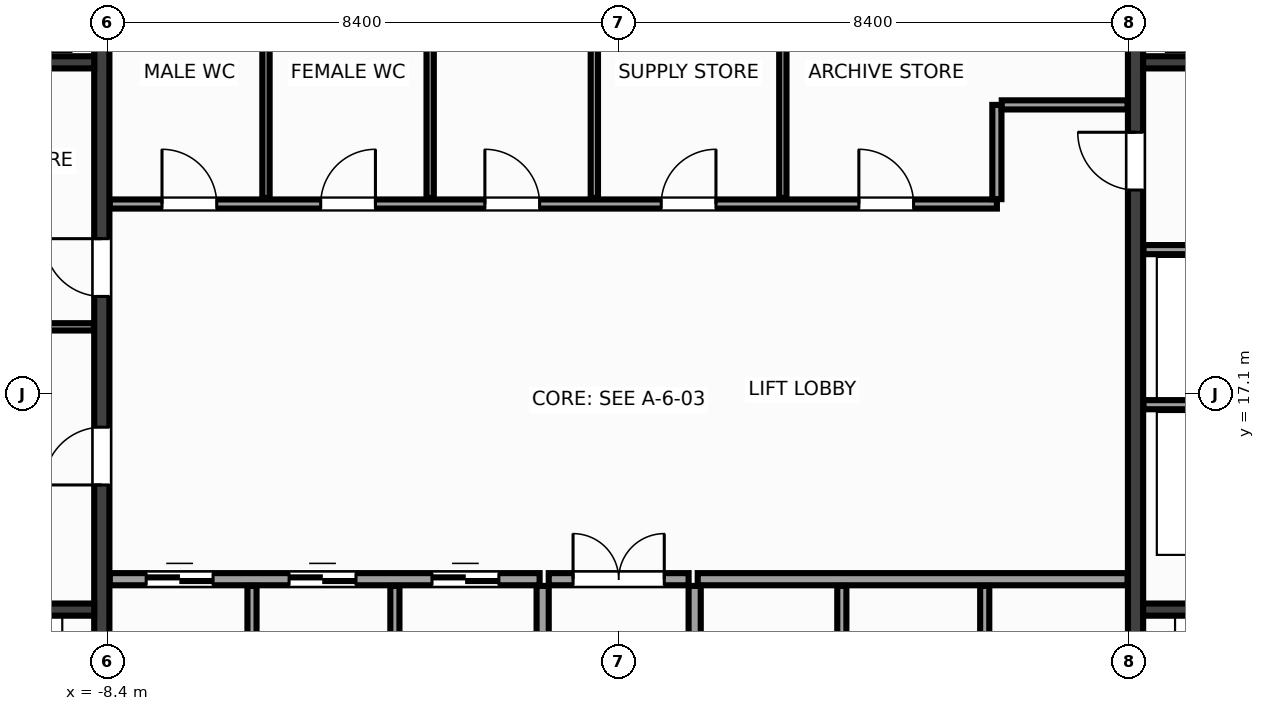
"""IFC4 building model, lengths in metres.
Left out: names, types, materials, properties, quantities, classifications, styles, units other than length and angle.
Written with IfcOpenShell. Run it as: python <this file> out.ifc"""

import sys

from ifc_helpers import new_model, si_unit, direction, frame, frame_2d, origin, place, context, subcontext, project, spatial, rectangle, extrude, source, transform, mapped, element, fill, save


model = new_model("IFC4")
c1 = context("Model", 3, precision=1e-05, world=origin(), true_north=direction((0.0, 1.0)))
c2 = subcontext(c1, "Body", "Model", "MODEL_VIEW")
j1 = project(units=[si_unit("LENGTHUNIT", "METRE"), si_unit("PLANEANGLEUNIT", "RADIAN")], contexts=[c1])
p1 = place(None, origin())
s1 = spatial("IfcSite", under=j1, at=p1, CompositionType="ELEMENT")
p2 = place(p1, origin())
s2 = spatial("IfcBuilding", under=s1, at=p2, CompositionType="ELEMENT")
p3 = place(p2, frame((0.0, 0.0, 56.0)))
s3 = spatial("IfcBuildingStorey", under=s2, at=p3, CompositionType="ELEMENT", Elevation=56.0)
m1 = source(origin(), c2, "Body", "SweptSolid", [
    extrude(rectangle(XDim=12.8, YDim=0.25, at=frame_2d((6.4, 0.0))), origin(), (0.0, 0.0, 1.0), 3.6),
])
p4 = place(p3, frame((-8.5, 10.6, 0.0), z_axis=(0.0, 0.0, 1.0), x_axis=(0.0, 1.0, 0.0)))
e1 = element("IfcWall", 1, at=p4, inside=s3, PredefinedType="SHEAR", context=c2, shape_type="MappedRepresentation", body=[
    mapped(m1, transform((0.0, 0.0, 0.0), x_axis=(1.0, 0.0, 0.0), y_axis=(0.0, 1.0, 0.0), z_axis=(0.0, 0.0, 1.0), scale=1.0)),
])
p5 = place(p4, frame((5.0, 0.0, 0.0)))
e2 = element("IfcOpeningElement", 2, at=p5, cuts=e1, PredefinedType="OPENING", context=c2, shape_type="SweptSolid", body=[
    extrude(rectangle(XDim=0.95, YDim=2.15, at=frame_2d((0.475, 1.075))), frame((0.0, 0.137, 0.0), z_axis=(0.0, -1.0, 0.0), x_axis=(1.0, 0.0, 0.0)), (0.0, 0.0, 1.0), 0.274),
])
p6 = place(p4, frame((8.1, 0.0, 0.0)))
e3 = element("IfcOpeningElement", 3, at=p6, cuts=e1, PredefinedType="OPENING", context=c2, shape_type="SweptSolid", body=[
    extrude(rectangle(XDim=0.95, YDim=2.15, at=frame_2d((0.475, 1.075))), frame((0.0, 0.137, 0.0), z_axis=(0.0, -1.0, 0.0), x_axis=(1.0, 0.0, 0.0)), (0.0, 0.0, 1.0), 0.274),
])
p7 = place(p3, frame((8.5, 10.6, 0.0), z_axis=(0.0, 0.0, 1.0), x_axis=(0.0, 1.0, 0.0)))
e4 = element("IfcWall", 4, at=p7, inside=s3, PredefinedType="SHEAR", context=c2, shape_type="MappedRepresentation", body=[
    mapped(m1, transform((0.0, 0.0, 0.0), x_axis=(1.0, 0.0, 0.0), y_axis=(0.0, 1.0, 0.0), z_axis=(0.0, 0.0, 1.0), scale=1.0)),
])
p8 = place(p7, frame((9.85, 0.0, 0.0)))
e5 = element("IfcOpeningElement", 5, at=p8, cuts=e4, PredefinedType="OPENING", context=c2, shape_type="SweptSolid", body=[
    extrude(rectangle(XDim=0.95, YDim=2.15, at=frame_2d((0.475, 1.075))), frame((0.0, 0.137, 0.0), z_axis=(0.0, -1.0, 0.0), x_axis=(1.0, 0.0, 0.0)), (0.0, 0.0, 1.0), 0.274),
])
m2 = source(origin(), c2, "Body", "SweptSolid", [
    extrude(rectangle(XDim=2.825, YDim=0.2, at=frame_2d((1.413, 0.0))), origin(), (0.0, 0.0, 1.0), 3.6),
])
for number, where, z_axis, x_axis in (
    (6, (-11.45, 13.55, 0.0), (0.0, 0.0, 1.0), (1.0, 0.0, 0.0)),
    (7, (8.625, 13.55, 0.0), (0.0, 0.0, 1.0), (1.0, 0.0, 0.0)),
):
    element("IfcWall", number, at=place(p3, frame(where, z_axis=z_axis, x_axis=x_axis)), inside=s3, PredefinedType="SHEAR", context=c2, shape_type="MappedRepresentation", body=[
        mapped(m2, transform((0.0, 0.0, 0.0), x_axis=(1.0, 0.0, 0.0), y_axis=(0.0, 1.0, 0.0), z_axis=(0.0, 0.0, 1.0), scale=1.0)),
    ])
m3 = source(origin(), c2, "Body", "SweptSolid", [
    extrude(rectangle(XDim=3.02, YDim=0.2, at=frame_2d((1.51, 0.0))), origin(), (0.0, 0.0, 1.0), 3.6),
])
for number, where, z_axis, x_axis in (
    (8, (-11.645, 22.55, 0.0), (0.0, 0.0, 1.0), (1.0, 0.0, 0.0)),
    (9, (8.625, 22.55, 0.0), (0.0, 0.0, 1.0), (1.0, 0.0, 0.0)),
):
    element("IfcWall", number, at=place(p3, frame(where, z_axis=z_axis, x_axis=x_axis)), inside=s3, PredefinedType="SHEAR", context=c2, shape_type="MappedRepresentation", body=[
        mapped(m3, transform((0.0, 0.0, 0.0), x_axis=(1.0, 0.0, 0.0), y_axis=(0.0, 1.0, 0.0), z_axis=(0.0, 0.0, 1.0), scale=1.0)),
    ])
m4 = source(origin(), c2, "Body", "SweptSolid", [
    extrude(rectangle(XDim=3.01, YDim=0.12, at=frame_2d((1.505, 0.0))), origin(), (0.0, 0.0, 1.0), 3.36),
])
p9 = place(p3, frame((-11.64, 18.2, 0.0), z_axis=(0.0, 0.0, 1.0), x_axis=(1.0, 0.0, 0.0)))
e10 = element("IfcWall", 10, at=p9, inside=s3, PredefinedType="PARTITIONING", context=c2, shape_type="MappedRepresentation", body=[
    mapped(m4, transform((0.0, 0.0, 0.0), x_axis=(1.0, 0.0, 0.0), y_axis=(0.0, 1.0, 0.0), z_axis=(0.0, 0.0, 1.0), scale=1.0)),
])
m5 = source(origin(), c2, "Body", "SweptSolid", [
    extrude(rectangle(XDim=3.01, YDim=0.15, at=frame_2d((1.505, 0.0))), origin(), (0.0, 0.0, 1.0), 3.36),
])
for number, where, z_axis, x_axis in (
    (11, (8.63, 16.92, 0.0), (0.0, 0.0, 1.0), (1.0, 0.0, 0.0)),
    (12, (8.63, 19.47, 0.0), (0.0, 0.0, 1.0), (1.0, 0.0, 0.0)),
):
    element("IfcWall", number, at=place(p3, frame(where, z_axis=z_axis, x_axis=x_axis)), inside=s3, PredefinedType="PARTITIONING", context=c2, shape_type="MappedRepresentation", body=[
        mapped(m5, transform((0.0, 0.0, 0.0), x_axis=(1.0, 0.0, 0.0), y_axis=(0.0, 1.0, 0.0), z_axis=(0.0, 0.0, 1.0), scale=1.0)),
    ])
m6 = source(origin(), c2, "Body", "SweptSolid", [
    extrude(rectangle(XDim=7.07, YDim=0.2, at=frame_2d((3.535, 0.0))), origin(), (0.0, 0.0, 1.0), 3.36),
])
p10 = place(p3, frame((-8.37, 14.05, 0.0), z_axis=(0.0, 0.0, 1.0), x_axis=(1.0, 0.0, 0.0)))
e13 = element("IfcWall", 13, at=p10, inside=s3, PredefinedType="PARTITIONING", context=c2, shape_type="MappedRepresentation", body=[
    mapped(m6, transform((0.0, 0.0, 0.0), x_axis=(1.0, 0.0, 0.0), y_axis=(0.0, 1.0, 0.0), z_axis=(0.0, 0.0, 1.0), scale=1.0)),
])
p11 = place(p10, frame((0.6, 0.0, 0.0)))
e14 = element("IfcOpeningElement", 14, at=p11, cuts=e13, PredefinedType="OPENING", context=c2, shape_type="SweptSolid", body=[
    extrude(rectangle(XDim=1.1, YDim=2.15, at=frame_2d((0.55, 1.075))), frame((0.0, 0.112, 0.0), z_axis=(0.0, -1.0, 0.0), x_axis=(1.0, 0.0, 0.0)), (0.0, 0.0, 1.0), 0.224),
])
p12 = place(p10, frame((2.95, 0.0, 0.0)))
e15 = element("IfcOpeningElement", 15, at=p12, cuts=e13, PredefinedType="OPENING", context=c2, shape_type="SweptSolid", body=[
    extrude(rectangle(XDim=1.1, YDim=2.15, at=frame_2d((0.55, 1.075))), frame((0.0, 0.112, 0.0), z_axis=(0.0, -1.0, 0.0), x_axis=(1.0, 0.0, 0.0)), (0.0, 0.0, 1.0), 0.224),
])
p13 = place(p10, frame((5.3, 0.0, 0.0)))
e16 = element("IfcOpeningElement", 16, at=p13, cuts=e13, PredefinedType="OPENING", context=c2, shape_type="SweptSolid", body=[
    extrude(rectangle(XDim=1.1, YDim=2.15, at=frame_2d((0.55, 1.075))), frame((0.0, 0.112, 0.0), z_axis=(0.0, -1.0, 0.0), x_axis=(1.0, 0.0, 0.0)), (0.0, 0.0, 1.0), 0.224),
])
p14 = place(p3, frame((1.3, 14.05, 0.0), z_axis=(0.0, 0.0, 1.0), x_axis=(1.0, 0.0, 0.0)))
e17 = element("IfcWall", 17, at=p14, inside=s3, PredefinedType="PARTITIONING", context=c2, shape_type="MappedRepresentation", body=[
    mapped(m6, transform((0.0, 0.0, 0.0), x_axis=(1.0, 0.0, 0.0), y_axis=(0.0, 1.0, 0.0), z_axis=(0.0, 0.0, 1.0), scale=1.0)),
])
m7 = source(origin(), c2, "Body", "SweptSolid", [
    extrude(rectangle(XDim=3.34, YDim=0.2, at=frame_2d((1.67, 0.0))), origin(), (0.0, 0.0, 1.0), 3.36),
])
for number, where, z_axis, x_axis in (
    (18, (-1.25, 10.6, 0.0), (0.0, 0.0, 1.0), (0.0, 1.0, 0.0)),
    (19, (1.25, 10.6, 0.0), (0.0, 0.0, 1.0), (0.0, 1.0, 0.0)),
):
    element("IfcWall", number, at=place(p3, frame(where, z_axis=z_axis, x_axis=x_axis)), inside=s3, PredefinedType="PARTITIONING", context=c2, shape_type="MappedRepresentation", body=[
        mapped(m7, transform((0.0, 0.0, 0.0), x_axis=(1.0, 0.0, 0.0), y_axis=(0.0, 1.0, 0.0), z_axis=(0.0, 0.0, 1.0), scale=1.0)),
    ])
m8 = source(origin(), c2, "Body", "SweptSolid", [
    extrude(rectangle(XDim=2.3, YDim=0.2, at=frame_2d((1.15, 0.0))), origin(), (0.0, 0.0, 1.0), 3.36),
])
p15 = place(p3, frame((-1.15, 14.05, 0.0), z_axis=(0.0, 0.0, 1.0), x_axis=(1.0, 0.0, 0.0)))
e20 = element("IfcWall", 20, at=p15, inside=s3, PredefinedType="PARTITIONING", context=c2, shape_type="MappedRepresentation", body=[
    mapped(m8, transform((0.0, 0.0, 0.0), x_axis=(1.0, 0.0, 0.0), y_axis=(0.0, 1.0, 0.0), z_axis=(0.0, 0.0, 1.0), scale=1.0)),
])
p16 = place(p15, frame((0.4, 0.0, 0.0)))
e21 = element("IfcOpeningElement", 21, at=p16, cuts=e20, PredefinedType="OPENING", context=c2, shape_type="SweptSolid", body=[
    extrude(rectangle(XDim=1.5, YDim=2.2, at=frame_2d((0.75, 1.1))), frame((0.0, 0.112, 0.0), z_axis=(0.0, -1.0, 0.0), x_axis=(1.0, 0.0, 0.0)), (0.0, 0.0, 1.0), 0.224),
])
m9 = source(origin(), c2, "Body", "SweptSolid", [
    extrude(rectangle(XDim=14.59, YDim=0.15, at=frame_2d((7.295, 0.0))), origin(), (0.0, 0.0, 1.0), 3.36),
])
p17 = place(p3, frame((-8.37, 20.22, 0.0), z_axis=(0.0, 0.0, 1.0), x_axis=(1.0, 0.0, 0.0)))
e22 = element("IfcWall", 22, at=p17, inside=s3, PredefinedType="PARTITIONING", context=c2, shape_type="MappedRepresentation", body=[
    mapped(m9, transform((0.0, 0.0, 0.0), x_axis=(1.0, 0.0, 0.0), y_axis=(0.0, 1.0, 0.0), z_axis=(0.0, 0.0, 1.0), scale=1.0)),
])
p18 = place(p17, frame((0.86, 0.0, 0.0)))
e23 = element("IfcOpeningElement", 23, at=p18, cuts=e22, PredefinedType="OPENING", context=c2, shape_type="SweptSolid", body=[
    extrude(rectangle(XDim=0.9, YDim=2.15, at=frame_2d((0.45, 1.075))), frame((0.0, 0.087, 0.0), z_axis=(0.0, -1.0, 0.0), x_axis=(1.0, 0.0, 0.0)), (0.0, 0.0, 1.0), 0.174),
])
p19 = place(p17, frame((3.47, 0.0, 0.0)))
e24 = element("IfcOpeningElement", 24, at=p19, cuts=e22, PredefinedType="OPENING", context=c2, shape_type="SweptSolid", body=[
    extrude(rectangle(XDim=0.9, YDim=2.15, at=frame_2d((0.45, 1.075))), frame((0.0, 0.087, 0.0), z_axis=(0.0, -1.0, 0.0), x_axis=(1.0, 0.0, 0.0)), (0.0, 0.0, 1.0), 0.174),
])
p20 = place(p17, frame((6.17, 0.0, 0.0)))
e25 = element("IfcOpeningElement", 25, at=p20, cuts=e22, PredefinedType="OPENING", context=c2, shape_type="SweptSolid", body=[
    extrude(rectangle(XDim=0.9, YDim=2.15, at=frame_2d((0.45, 1.075))), frame((0.0, 0.087, 0.0), z_axis=(0.0, -1.0, 0.0), x_axis=(1.0, 0.0, 0.0)), (0.0, 0.0, 1.0), 0.174),
])
p21 = place(p17, frame((9.07, 0.0, 0.0)))
e26 = element("IfcOpeningElement", 26, at=p21, cuts=e22, PredefinedType="OPENING", context=c2, shape_type="SweptSolid", body=[
    extrude(rectangle(XDim=0.9, YDim=2.15, at=frame_2d((0.45, 1.075))), frame((0.0, 0.087, 0.0), z_axis=(0.0, -1.0, 0.0), x_axis=(1.0, 0.0, 0.0)), (0.0, 0.0, 1.0), 0.174),
])
p22 = place(p17, frame((12.32, 0.0, 0.0)))
e27 = element("IfcOpeningElement", 27, at=p22, cuts=e22, PredefinedType="OPENING", context=c2, shape_type="SweptSolid", body=[
    extrude(rectangle(XDim=0.9, YDim=2.15, at=frame_2d((0.45, 1.075))), frame((0.0, 0.087, 0.0), z_axis=(0.0, -1.0, 0.0), x_axis=(1.0, 0.0, 0.0)), (0.0, 0.0, 1.0), 0.174),
])
m10 = source(origin(), c2, "Body", "SweptSolid", [
    extrude(rectangle(XDim=1.55, YDim=0.15, at=frame_2d((0.775, 0.0))), origin(), (0.0, 0.0, 1.0), 3.36),
])
p23 = place(p3, frame((6.22, 20.3, 0.0), z_axis=(0.0, 0.0, 1.0), x_axis=(0.0, 1.0, 0.0)))
e28 = element("IfcWall", 28, at=p23, inside=s3, PredefinedType="PARTITIONING", context=c2, shape_type="MappedRepresentation", body=[
    mapped(m10, transform((0.0, 0.0, 0.0), x_axis=(1.0, 0.0, 0.0), y_axis=(0.0, 1.0, 0.0), z_axis=(0.0, 0.0, 1.0), scale=1.0)),
])
m11 = source(origin(), c2, "Body", "SweptSolid", [
    extrude(rectangle(XDim=2.07, YDim=0.15, at=frame_2d((1.035, 0.0))), origin(), (0.0, 0.0, 1.0), 3.36),
])
p24 = place(p3, frame((6.3, 21.85, 0.0), z_axis=(0.0, 0.0, 1.0), x_axis=(1.0, 0.0, 0.0)))
e29 = element("IfcWall", 29, at=p24, inside=s3, PredefinedType="PARTITIONING", context=c2, shape_type="MappedRepresentation", body=[
    mapped(m11, transform((0.0, 0.0, 0.0), x_axis=(1.0, 0.0, 0.0), y_axis=(0.0, 1.0, 0.0), z_axis=(0.0, 0.0, 1.0), scale=1.0)),
])
m12 = source(origin(), c2, "Body", "SweptSolid", [
    extrude(rectangle(XDim=3.34, YDim=0.15, at=frame_2d((1.67, 0.0))), origin(), (0.0, 0.0, 1.0), 3.36),
])
for number, where, z_axis, x_axis in (
    (30, (-6.03, 10.6, 0.0), (0.0, 0.0, 1.0), (0.0, 1.0, 0.0)),
    (31, (-3.68, 10.6, 0.0), (0.0, 0.0, 1.0), (0.0, 1.0, 0.0)),
    (32, (3.67, 10.6, 0.0), (0.0, 0.0, 1.0), (0.0, 1.0, 0.0)),
    (33, (6.02, 10.6, 0.0), (0.0, 0.0, 1.0), (0.0, 1.0, 0.0)),
):
    element("IfcWall", number, at=place(p3, frame(where, z_axis=z_axis, x_axis=x_axis)), inside=s3, PredefinedType="PARTITIONING", context=c2, shape_type="MappedRepresentation", body=[
        mapped(m12, transform((0.0, 0.0, 0.0), x_axis=(1.0, 0.0, 0.0), y_axis=(0.0, 1.0, 0.0), z_axis=(0.0, 0.0, 1.0), scale=1.0)),
    ])
m13 = source(origin(), c2, "Body", "SweptSolid", [
    extrude(rectangle(XDim=3.04, YDim=0.12, at=frame_2d((1.52, 0.0))), origin(), (0.0, 0.0, 1.0), 3.36),
])
for number, where, z_axis, x_axis in (
    (34, (-5.8, 20.32, 0.0), (0.0, 0.0, 1.0), (0.0, 1.0, 0.0)),
    (35, (-3.1, 20.32, 0.0), (0.0, 0.0, 1.0), (0.0, 1.0, 0.0)),
    (36, (-0.4, 20.32, 0.0), (0.0, 0.0, 1.0), (0.0, 1.0, 0.0)),
    (37, (2.7, 20.32, 0.0), (0.0, 0.0, 1.0), (0.0, 1.0, 0.0)),
):
    element("IfcWall", number, at=place(p3, frame(where, z_axis=z_axis, x_axis=x_axis)), inside=s3, PredefinedType="PARTITIONING", context=c2, shape_type="MappedRepresentation", body=[
        mapped(m13, transform((0.0, 0.0, 0.0), x_axis=(1.0, 0.0, 0.0), y_axis=(0.0, 1.0, 0.0), z_axis=(0.0, 0.0, 1.0), scale=1.0)),
    ])
m14 = source(origin(), c2, "Body", "SweptSolid", [
    extrude(rectangle(XDim=0.95, YDim=2.15, at=frame_2d((0.475, 1.075))), frame((0.0, 0.025, 0.0), z_axis=(0.0, -1.0, 0.0), x_axis=(1.0, 0.0, 0.0)), (0.0, 0.0, 1.0), 0.05),
])
p25 = place(p5, origin())
e38 = element("IfcDoor", 38, at=p25, inside=s3, OperationType="SINGLE_SWING_LEFT", PredefinedType="DOOR", context=c2, shape_type="MappedRepresentation", body=[
    mapped(m14, transform((0.0, 0.0, 0.0), x_axis=(1.0, 0.0, 0.0), y_axis=(0.0, 1.0, 0.0), z_axis=(0.0, 0.0, 1.0), scale=1.0)),
])
fill(e2, e38)
p26 = place(p6, origin())
e39 = element("IfcDoor", 39, at=p26, inside=s3, OperationType="SINGLE_SWING_RIGHT", PredefinedType="DOOR", context=c2, shape_type="MappedRepresentation", body=[
    mapped(m14, transform((0.0, 0.0, 0.0), x_axis=(1.0, 0.0, 0.0), y_axis=(0.0, 1.0, 0.0), z_axis=(0.0, 0.0, 1.0), scale=1.0)),
])
fill(e3, e39)
m15 = source(origin(), c2, "Body", "SweptSolid", [
    extrude(rectangle(XDim=0.95, YDim=2.15, at=frame_2d((0.475, 1.075))), frame((0.0, 0.025, 0.0), z_axis=(0.0, -1.0, 0.0), x_axis=(1.0, 0.0, 0.0)), (0.0, 0.0, 1.0), 0.05),
])
p27 = place(p8, origin())
e40 = element("IfcDoor", 40, at=p27, inside=s3, OperationType="SINGLE_SWING_RIGHT", PredefinedType="DOOR", context=c2, shape_type="MappedRepresentation", body=[
    mapped(m15, transform((0.0, 0.0, 0.0), x_axis=(1.0, 0.0, 0.0), y_axis=(0.0, 1.0, 0.0), z_axis=(0.0, 0.0, 1.0), scale=1.0)),
])
fill(e5, e40)
m16 = source(origin(), c2, "Body", "SweptSolid", [
    extrude(rectangle(XDim=1.1, YDim=2.15, at=frame_2d((0.55, 1.075))), frame((0.0, 0.025, 0.0), z_axis=(0.0, -1.0, 0.0), x_axis=(1.0, 0.0, 0.0)), (0.0, 0.0, 1.0), 0.05),
])
p28 = place(p11, origin())
e41 = element("IfcDoor", 41, at=p28, inside=s3, OperationType="DOUBLE_DOOR_SLIDING", PredefinedType="DOOR", context=c2, shape_type="MappedRepresentation", body=[
    mapped(m16, transform((0.0, 0.0, 0.0), x_axis=(1.0, 0.0, 0.0), y_axis=(0.0, 1.0, 0.0), z_axis=(0.0, 0.0, 1.0), scale=1.0)),
])
fill(e14, e41)
p29 = place(p12, origin())
e42 = element("IfcDoor", 42, at=p29, inside=s3, OperationType="DOUBLE_DOOR_SLIDING", PredefinedType="DOOR", context=c2, shape_type="MappedRepresentation", body=[
    mapped(m16, transform((0.0, 0.0, 0.0), x_axis=(1.0, 0.0, 0.0), y_axis=(0.0, 1.0, 0.0), z_axis=(0.0, 0.0, 1.0), scale=1.0)),
])
fill(e15, e42)
p30 = place(p13, origin())
e43 = element("IfcDoor", 43, at=p30, inside=s3, OperationType="DOUBLE_DOOR_SLIDING", PredefinedType="DOOR", context=c2, shape_type="MappedRepresentation", body=[
    mapped(m16, transform((0.0, 0.0, 0.0), x_axis=(1.0, 0.0, 0.0), y_axis=(0.0, 1.0, 0.0), z_axis=(0.0, 0.0, 1.0), scale=1.0)),
])
fill(e16, e43)
m17 = source(origin(), c2, "Body", "SweptSolid", [
    extrude(rectangle(XDim=1.5, YDim=2.2, at=frame_2d((0.75, 1.1))), frame((0.0, 0.025, 0.0), z_axis=(0.0, -1.0, 0.0), x_axis=(1.0, 0.0, 0.0)), (0.0, 0.0, 1.0), 0.05),
])
p31 = place(p16, origin())
e44 = element("IfcDoor", 44, at=p31, inside=s3, OperationType="DOUBLE_DOOR_SINGLE_SWING", PredefinedType="DOOR", context=c2, shape_type="MappedRepresentation", body=[
    mapped(m17, transform((0.0, 0.0, 0.0), x_axis=(1.0, 0.0, 0.0), y_axis=(0.0, 1.0, 0.0), z_axis=(0.0, 0.0, 1.0), scale=1.0)),
])
fill(e21, e44)
m18 = source(origin(), c2, "Body", "SweptSolid", [
    extrude(rectangle(XDim=0.9, YDim=2.15, at=frame_2d((0.45, 1.075))), frame((0.0, 0.025, 0.0), z_axis=(0.0, -1.0, 0.0), x_axis=(1.0, 0.0, 0.0)), (0.0, 0.0, 1.0), 0.05),
])
p32 = place(p18, origin())
e45 = element("IfcDoor", 45, at=p32, inside=s3, OperationType="SINGLE_SWING_LEFT", PredefinedType="DOOR", context=c2, shape_type="MappedRepresentation", body=[
    mapped(m18, transform((0.0, 0.0, 0.0), x_axis=(1.0, 0.0, 0.0), y_axis=(0.0, 1.0, 0.0), z_axis=(0.0, 0.0, 1.0), scale=1.0)),
])
fill(e23, e45)
p33 = place(p19, origin())
e46 = element("IfcDoor", 46, at=p33, inside=s3, OperationType="SINGLE_SWING_RIGHT", PredefinedType="DOOR", context=c2, shape_type="MappedRepresentation", body=[
    mapped(m18, transform((0.0, 0.0, 0.0), x_axis=(1.0, 0.0, 0.0), y_axis=(0.0, 1.0, 0.0), z_axis=(0.0, 0.0, 1.0), scale=1.0)),
])
fill(e24, e46)
p34 = place(p20, origin())
e47 = element("IfcDoor", 47, at=p34, inside=s3, OperationType="SINGLE_SWING_LEFT", PredefinedType="DOOR", context=c2, shape_type="MappedRepresentation", body=[
    mapped(m18, transform((0.0, 0.0, 0.0), x_axis=(1.0, 0.0, 0.0), y_axis=(0.0, 1.0, 0.0), z_axis=(0.0, 0.0, 1.0), scale=1.0)),
])
fill(e25, e47)
p35 = place(p21, origin())
e48 = element("IfcDoor", 48, at=p35, inside=s3, OperationType="SINGLE_SWING_RIGHT", PredefinedType="DOOR", context=c2, shape_type="MappedRepresentation", body=[
    mapped(m18, transform((0.0, 0.0, 0.0), x_axis=(1.0, 0.0, 0.0), y_axis=(0.0, 1.0, 0.0), z_axis=(0.0, 0.0, 1.0), scale=1.0)),
])
fill(e26, e48)
p36 = place(p22, origin())
e49 = element("IfcDoor", 49, at=p36, inside=s3, OperationType="SINGLE_SWING_LEFT", PredefinedType="DOOR", context=c2, shape_type="MappedRepresentation", body=[
    mapped(m18, transform((0.0, 0.0, 0.0), x_axis=(1.0, 0.0, 0.0), y_axis=(0.0, 1.0, 0.0), z_axis=(0.0, 0.0, 1.0), scale=1.0)),
])
fill(e27, e49)
save(model, sys.argv[1])
